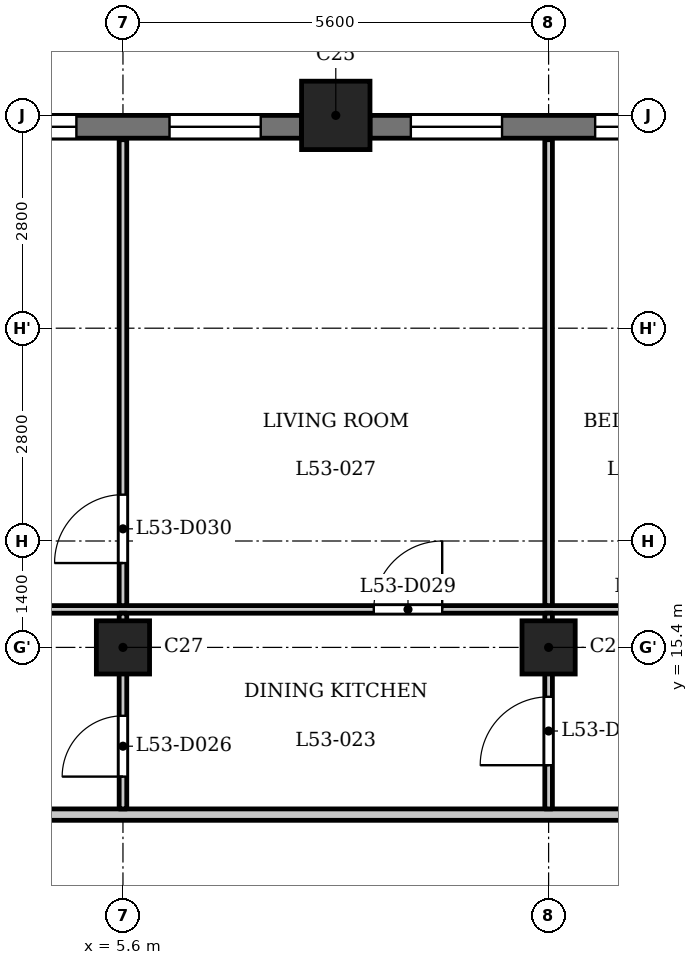
"""IFC4 building model, lengths in metres.
Left out: names, types, materials, properties, quantities, classifications, styles, units other than length and angle.
Written with IfcOpenShell. Run it as: python <this file> out.ifc"""

import sys

from ifc_helpers import new_model, si_unit, direction, frame, frame_2d, origin, origin_2d, place, context, subcontext, project, spatial, rectangle, extrude, element, fill, save


model = new_model("IFC4")
c1 = context("Model", 3, precision=1e-05, world=origin(), true_north=direction((0.0, 1.0)))
c2 = subcontext(c1, "Body", "Model", "MODEL_VIEW")
j1 = project(units=[si_unit("LENGTHUNIT", "METRE"), si_unit("PLANEANGLEUNIT", "RADIAN")], contexts=[c1])
p1 = place(None, origin())
s1 = spatial("IfcSite", under=j1, at=p1, CompositionType="ELEMENT")
p2 = place(p1, origin())
s2 = spatial("IfcBuilding", under=s1, at=p2, CompositionType="ELEMENT")
p3 = place(p2, frame((0.0, 0.0, 206.4)))
s3 = spatial("IfcBuildingStorey", under=s2, at=p3, CompositionType="ELEMENT", Elevation=206.4)
p4 = place(p3, frame((8.4, 22.4, 0.0), z_axis=(0.0, 0.0, 1.0), x_axis=(1.0, 0.0, 0.0)))
e1 = element("IfcColumn", 1, at=p4, inside=s3, PredefinedType="COLUMN", context=c2, shape_type="SweptSolid", body=[
    extrude(rectangle(XDim=0.9, YDim=0.9, at=origin_2d()), origin(), (0.0, 0.0, 1.0), 3.5),
])
for number, where, z_axis, x_axis in (
    (2, (5.6, 15.4, 0.0), (0.0, 0.0, 1.0), (1.0, 0.0, 0.0)),
    (3, (11.2, 15.4, 0.0), (0.0, 0.0, 1.0), (1.0, 0.0, 0.0)),
):
    element("IfcColumn", number, at=place(p3, frame(where, z_axis=z_axis, x_axis=x_axis)), inside=s3, PredefinedType="COLUMN", context=c2, shape_type="SweptSolid", body=[
        extrude(rectangle(XDim=0.7, YDim=0.7, at=origin_2d()), origin(), (0.0, 0.0, 1.0), 3.5),
    ])
p5 = place(p3, frame((13.55, 22.25, 0.0), z_axis=(0.0, 0.0, 1.0), x_axis=(-1.0, 0.0, 0.0)))
e4 = element("IfcWall", 4, at=p5, inside=s3, PredefinedType="SOLIDWALL", context=c2, shape_type="SweptSolid", body=[
    extrude(rectangle(XDim=4.7, YDim=0.3, at=frame_2d((2.35, 0.0))), origin(), (0.0, 0.0, 1.0), 2.5),
])
p6 = place(p5, frame((0.538, 0.0, 0.6)))
e5 = element("IfcOpeningElement", 5, at=p6, cuts=e4, PredefinedType="OPENING", context=c2, shape_type="SweptSolid", body=[
    extrude(rectangle(XDim=1.2, YDim=1.55, at=frame_2d((0.6, 0.775))), frame((0.0, 0.16, 0.0), z_axis=(0.0, -1.0, 0.0), x_axis=(1.0, 0.0, 0.0)), (0.0, 0.0, 1.0), 0.32),
])
p7 = place(p5, frame((2.962, 0.0, 0.6)))
e6 = element("IfcOpeningElement", 6, at=p7, cuts=e4, PredefinedType="OPENING", context=c2, shape_type="SweptSolid", body=[
    extrude(rectangle(XDim=1.2, YDim=1.55, at=frame_2d((0.6, 0.775))), frame((0.0, 0.16, 0.0), z_axis=(0.0, -1.0, 0.0), x_axis=(1.0, 0.0, 0.0)), (0.0, 0.0, 1.0), 0.32),
])
p8 = place(p3, frame((7.95, 22.25, 0.0), z_axis=(0.0, 0.0, 1.0), x_axis=(-1.0, 0.0, 0.0)))
e7 = element("IfcWall", 7, at=p8, inside=s3, PredefinedType="SOLIDWALL", context=c2, shape_type="SweptSolid", body=[
    extrude(rectangle(XDim=4.7, YDim=0.3, at=frame_2d((2.35, 0.0))), origin(), (0.0, 0.0, 1.0), 2.5),
])
p9 = place(p8, frame((0.538, 0.0, 0.6)))
e8 = element("IfcOpeningElement", 8, at=p9, cuts=e7, PredefinedType="OPENING", context=c2, shape_type="SweptSolid", body=[
    extrude(rectangle(XDim=1.2, YDim=1.55, at=frame_2d((0.6, 0.775))), frame((0.0, 0.16, 0.0), z_axis=(0.0, -1.0, 0.0), x_axis=(1.0, 0.0, 0.0)), (0.0, 0.0, 1.0), 0.32),
])
p10 = place(p8, frame((2.962, 0.0, 0.6)))
e9 = element("IfcOpeningElement", 9, at=p10, cuts=e7, PredefinedType="OPENING", context=c2, shape_type="SweptSolid", body=[
    extrude(rectangle(XDim=1.2, YDim=1.55, at=frame_2d((0.6, 0.775))), frame((0.0, 0.16, 0.0), z_axis=(0.0, -1.0, 0.0), x_axis=(1.0, 0.0, 0.0)), (0.0, 0.0, 1.0), 0.32),
])
p11 = place(p3, frame((-17.4, 13.2, 0.0), z_axis=(0.0, 0.0, 1.0), x_axis=(1.0, 0.0, 0.0)))
e10 = element("IfcWall", 10, at=p11, inside=s3, PredefinedType="PARTITIONING", context=c2, shape_type="SweptSolid", body=[
    extrude(rectangle(XDim=34.8, YDim=0.15, at=frame_2d((17.4, 0.0))), origin(), (0.0, 0.0, 1.0), 3.2),
])
p12 = place(p11, frame((0.25, 0.0, 0.0)))
e11 = element("IfcOpeningElement", 11, at=p12, cuts=e10, PredefinedType="OPENING", context=c2, shape_type="SweptSolid", body=[
    extrude(rectangle(XDim=1.0, YDim=2.1, at=frame_2d((0.5, 1.05))), frame((0.0, 0.085, 0.0), z_axis=(0.0, -1.0, 0.0), x_axis=(1.0, 0.0, 0.0)), (0.0, 0.0, 1.0), 0.17),
])
p13 = place(p11, frame((33.65, 0.0, 0.0)))
e12 = element("IfcOpeningElement", 12, at=p13, cuts=e10, PredefinedType="OPENING", context=c2, shape_type="SweptSolid", body=[
    extrude(rectangle(XDim=1.0, YDim=2.1, at=frame_2d((0.5, 1.05))), frame((0.0, 0.085, 0.0), z_axis=(0.0, -1.0, 0.0), x_axis=(1.0, 0.0, 0.0)), (0.0, 0.0, 1.0), 0.17),
])
p14 = place(p3, frame((-16.725, 15.9, 0.0), z_axis=(0.0, 0.0, 1.0), x_axis=(1.0, 0.0, 0.0)))
e13 = element("IfcWall", 13, at=p14, inside=s3, PredefinedType="PARTITIONING", context=c2, shape_type="SweptSolid", body=[
    extrude(rectangle(XDim=33.45, YDim=0.1, at=frame_2d((16.725, 0.0))), origin(), (0.0, 0.0, 1.0), 3.2),
])
p15 = place(p14, frame((1.875, 0.0, 0.0)))
e14 = element("IfcOpeningElement", 14, at=p15, cuts=e13, PredefinedType="OPENING", context=c2, shape_type="SweptSolid", body=[
    extrude(rectangle(XDim=0.9, YDim=2.1, at=frame_2d((0.45, 1.05))), frame((0.0, 0.06, 0.0), z_axis=(0.0, -1.0, 0.0), x_axis=(1.0, 0.0, 0.0)), (0.0, 0.0, 1.0), 0.12),
])
p16 = place(p14, frame((3.975, 0.0, 0.0)))
e15 = element("IfcOpeningElement", 15, at=p16, cuts=e13, PredefinedType="OPENING", context=c2, shape_type="SweptSolid", body=[
    extrude(rectangle(XDim=0.9, YDim=2.1, at=frame_2d((0.45, 1.05))), frame((0.0, 0.06, 0.0), z_axis=(0.0, -1.0, 0.0), x_axis=(1.0, 0.0, 0.0)), (0.0, 0.0, 1.0), 0.12),
])
p17 = place(p14, frame((6.825, 0.0, 0.0)))
e16 = element("IfcOpeningElement", 16, at=p17, cuts=e13, PredefinedType="OPENING", context=c2, shape_type="SweptSolid", body=[
    extrude(rectangle(XDim=0.9, YDim=2.1, at=frame_2d((0.45, 1.05))), frame((0.0, 0.06, 0.0), z_axis=(0.0, -1.0, 0.0), x_axis=(1.0, 0.0, 0.0)), (0.0, 0.0, 1.0), 0.12),
])
p18 = place(p14, frame((28.975, 0.0, 0.0)))
e17 = element("IfcOpeningElement", 17, at=p18, cuts=e13, PredefinedType="OPENING", context=c2, shape_type="SweptSolid", body=[
    extrude(rectangle(XDim=0.9, YDim=2.1, at=frame_2d((0.45, 1.05))), frame((0.0, 0.06, 0.0), z_axis=(0.0, -1.0, 0.0), x_axis=(1.0, 0.0, 0.0)), (0.0, 0.0, 1.0), 0.12),
])
p19 = place(p14, frame((30.725, 0.0, 0.0)))
e18 = element("IfcOpeningElement", 18, at=p19, cuts=e13, PredefinedType="OPENING", context=c2, shape_type="SweptSolid", body=[
    extrude(rectangle(XDim=0.9, YDim=2.1, at=frame_2d((0.45, 1.05))), frame((0.0, 0.06, 0.0), z_axis=(0.0, -1.0, 0.0), x_axis=(1.0, 0.0, 0.0)), (0.0, 0.0, 1.0), 0.12),
])
p20 = place(p14, frame((25.625, 0.0, 0.0)))
e19 = element("IfcOpeningElement", 19, at=p20, cuts=e13, PredefinedType="OPENING", context=c2, shape_type="SweptSolid", body=[
    extrude(rectangle(XDim=0.9, YDim=2.1, at=frame_2d((0.45, 1.05))), frame((0.0, 0.06, 0.0), z_axis=(0.0, -1.0, 0.0), x_axis=(1.0, 0.0, 0.0)), (0.0, 0.0, 1.0), 0.12),
])
p21 = place(p3, frame((5.6, 13.275, 0.0), z_axis=(0.0, 0.0, 1.0), x_axis=(0.0, 1.0, 0.0)))
e20 = element("IfcWall", 20, at=p21, inside=s3, PredefinedType="PARTITIONING", context=c2, shape_type="SweptSolid", body=[
    extrude(rectangle(XDim=2.575, YDim=0.1, at=frame_2d((1.288, 0.0))), origin(), (0.0, 0.0, 1.0), 3.2),
])
p22 = place(p21, frame((0.425, 0.0, 0.0)))
e21 = element("IfcOpeningElement", 21, at=p22, cuts=e20, PredefinedType="OPENING", context=c2, shape_type="SweptSolid", body=[
    extrude(rectangle(XDim=0.8, YDim=2.1, at=frame_2d((0.4, 1.05))), frame((0.0, 0.06, 0.0), z_axis=(0.0, -1.0, 0.0), x_axis=(1.0, 0.0, 0.0)), (0.0, 0.0, 1.0), 0.12),
])
p23 = place(p3, frame((5.6, 15.95, 0.0), z_axis=(0.0, 0.0, 1.0), x_axis=(0.0, 1.0, 0.0)))
e22 = element("IfcWall", 22, at=p23, inside=s3, PredefinedType="PARTITIONING", context=c2, shape_type="SweptSolid", body=[
    extrude(rectangle(XDim=6.13, YDim=0.1, at=frame_2d((3.065, 0.0))), origin(), (0.0, 0.0, 1.0), 3.2),
])
p24 = place(p23, frame((0.56, 0.0, 0.0)))
e23 = element("IfcOpeningElement", 23, at=p24, cuts=e22, PredefinedType="OPENING", context=c2, shape_type="SweptSolid", body=[
    extrude(rectangle(XDim=0.9, YDim=2.1, at=frame_2d((0.45, 1.05))), frame((0.0, 0.06, 0.0), z_axis=(0.0, -1.0, 0.0), x_axis=(1.0, 0.0, 0.0)), (0.0, 0.0, 1.0), 0.12),
])
p25 = place(p3, frame((11.2, 13.275, 0.0), z_axis=(0.0, 0.0, 1.0), x_axis=(0.0, 1.0, 0.0)))
e24 = element("IfcWall", 24, at=p25, inside=s3, PredefinedType="PARTITIONING", context=c2, shape_type="SweptSolid", body=[
    extrude(rectangle(XDim=2.575, YDim=0.1, at=frame_2d((1.288, 0.0))), origin(), (0.0, 0.0, 1.0), 3.2),
])
p26 = place(p25, frame((0.575, 0.0, 0.0)))
e25 = element("IfcOpeningElement", 25, at=p26, cuts=e24, PredefinedType="OPENING", context=c2, shape_type="SweptSolid", body=[
    extrude(rectangle(XDim=0.9, YDim=2.1, at=frame_2d((0.45, 1.05))), frame((0.0, 0.06, 0.0), z_axis=(0.0, -1.0, 0.0), x_axis=(1.0, 0.0, 0.0)), (0.0, 0.0, 1.0), 0.12),
])
p27 = place(p3, frame((11.2, 15.95, 0.0), z_axis=(0.0, 0.0, 1.0), x_axis=(0.0, 1.0, 0.0)))
e26 = element("IfcWall", 26, at=p27, inside=s3, PredefinedType="PARTITIONING", context=c2, shape_type="SweptSolid", body=[
    extrude(rectangle(XDim=6.13, YDim=0.1, at=frame_2d((3.065, 0.0))), origin(), (0.0, 0.0, 1.0), 3.2),
])
p28 = place(p26, origin())
e27 = element("IfcDoor", 27, at=p28, inside=s3, OperationType="SINGLE_SWING_RIGHT", PredefinedType="DOOR", context=c2, shape_type="SweptSolid", body=[
    extrude(rectangle(XDim=0.9, YDim=2.1, at=frame_2d((0.45, 1.05))), frame((0.0, 0.025, 0.0), z_axis=(0.0, -1.0, 0.0), x_axis=(1.0, 0.0, 0.0)), (0.0, 0.0, 1.0), 0.05),
])
fill(e25, e27)
p29 = place(p22, origin())
e28 = element("IfcDoor", 28, at=p29, inside=s3, OperationType="SINGLE_SWING_RIGHT", PredefinedType="DOOR", context=c2, shape_type="SweptSolid", body=[
    extrude(rectangle(XDim=0.8, YDim=2.1, at=frame_2d((0.4, 1.05))), frame((0.0, 0.025, 0.0), z_axis=(0.0, -1.0, 0.0), x_axis=(1.0, 0.0, 0.0)), (0.0, 0.0, 1.0), 0.05),
])
fill(e21, e28)
p30 = place(p20, origin())
e29 = element("IfcDoor", 29, at=p30, inside=s3, OperationType="SINGLE_SWING_LEFT", PredefinedType="DOOR", context=c2, shape_type="SweptSolid", body=[
    extrude(rectangle(XDim=0.9, YDim=2.1, at=frame_2d((0.45, 1.05))), frame((0.0, 0.025, 0.0), z_axis=(0.0, -1.0, 0.0), x_axis=(1.0, 0.0, 0.0)), (0.0, 0.0, 1.0), 0.05),
])
fill(e19, e29)
p31 = place(p24, origin())
e30 = element("IfcDoor", 30, at=p31, inside=s3, OperationType="SINGLE_SWING_RIGHT", PredefinedType="DOOR", context=c2, shape_type="SweptSolid", body=[
    extrude(rectangle(XDim=0.9, YDim=2.1, at=frame_2d((0.45, 1.05))), frame((0.0, 0.025, 0.0), z_axis=(0.0, -1.0, 0.0), x_axis=(1.0, 0.0, 0.0)), (0.0, 0.0, 1.0), 0.05),
])
fill(e23, e30)
p32 = place(p6, origin())
e31 = element("IfcWindow", 31, at=p32, inside=s3, PartitioningType="SINGLE_PANEL", PredefinedType="WINDOW", context=c2, shape_type="SweptSolid", body=[
    extrude(rectangle(XDim=1.2, YDim=1.55, at=frame_2d((0.6, 0.775))), frame((0.0, 0.03, 0.0), z_axis=(0.0, -1.0, 0.0), x_axis=(1.0, 0.0, 0.0)), (0.0, 0.0, 1.0), 0.06),
])
fill(e5, e31)
p33 = place(p7, origin())
e32 = element("IfcWindow", 32, at=p33, inside=s3, PartitioningType="SINGLE_PANEL", PredefinedType="WINDOW", context=c2, shape_type="SweptSolid", body=[
    extrude(rectangle(XDim=1.2, YDim=1.55, at=frame_2d((0.6, 0.775))), frame((0.0, 0.03, 0.0), z_axis=(0.0, -1.0, 0.0), x_axis=(1.0, 0.0, 0.0)), (0.0, 0.0, 1.0), 0.06),
])
fill(e6, e32)
p34 = place(p9, origin())
e33 = element("IfcWindow", 33, at=p34, inside=s3, PartitioningType="SINGLE_PANEL", PredefinedType="WINDOW", context=c2, shape_type="SweptSolid", body=[
    extrude(rectangle(XDim=1.2, YDim=1.55, at=frame_2d((0.6, 0.775))), frame((0.0, 0.03, 0.0), z_axis=(0.0, -1.0, 0.0), x_axis=(1.0, 0.0, 0.0)), (0.0, 0.0, 1.0), 0.06),
])
fill(e8, e33)
p35 = place(p10, origin())
e34 = element("IfcWindow", 34, at=p35, inside=s3, PartitioningType="SINGLE_PANEL", PredefinedType="WINDOW", context=c2, shape_type="SweptSolid", body=[
    extrude(rectangle(XDim=1.2, YDim=1.55, at=frame_2d((0.6, 0.775))), frame((0.0, 0.03, 0.0), z_axis=(0.0, -1.0, 0.0), x_axis=(1.0, 0.0, 0.0)), (0.0, 0.0, 1.0), 0.06),
])
fill(e9, e34)
save(model, sys.argv[1])
